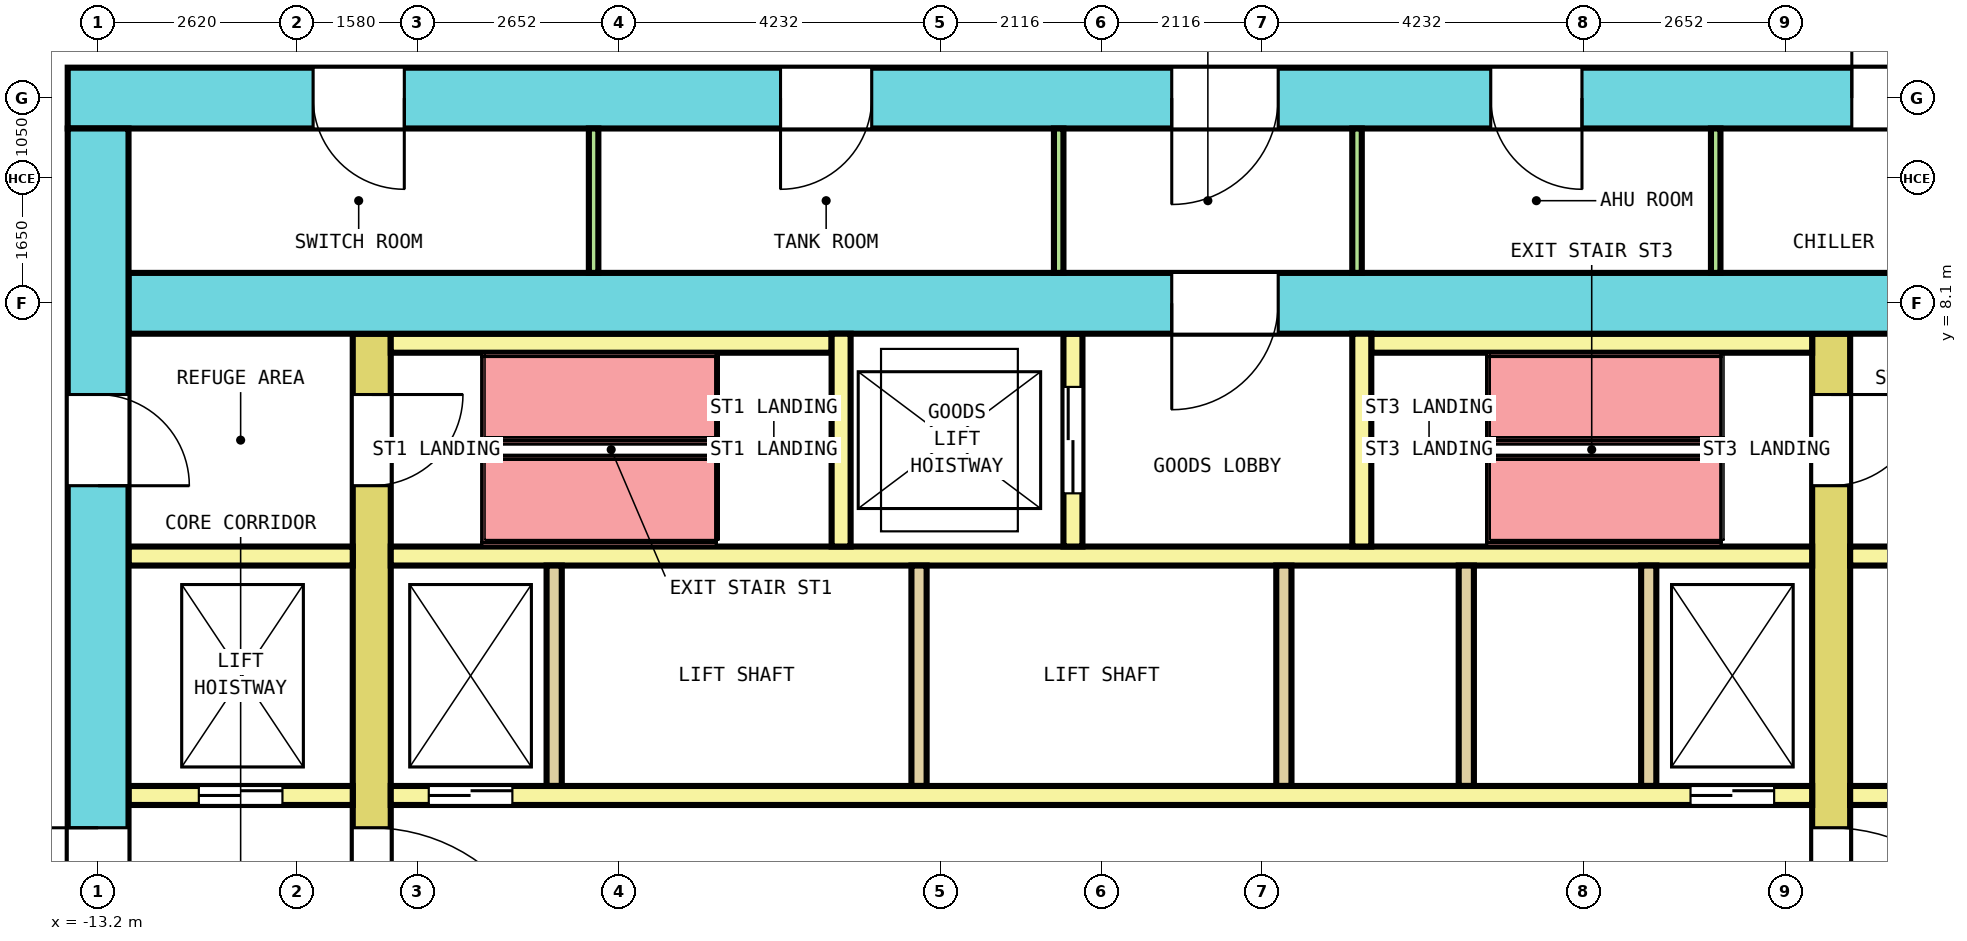
"""IFC4 building model, lengths in metres.
Left out: names, types, materials, properties, quantities, classifications, styles, units other than length and angle.
Written with IfcOpenShell. Run it as: python <this file> out.ifc"""

import sys

from ifc_helpers import new_model, si_unit, direction, frame, frame_2d, origin, place, context, subcontext, project, spatial, rectangle, extrude, element, fill, save


model = new_model("IFC4")
c1 = context("Model", 3, precision=1e-05, world=origin(), true_north=direction((0.0, 1.0)))
c2 = subcontext(c1, "Body", "Model", "MODEL_VIEW")
j1 = project(units=[si_unit("LENGTHUNIT", "METRE"), si_unit("PLANEANGLEUNIT", "RADIAN")], contexts=[c1])
p1 = place(None, origin())
s1 = spatial("IfcSite", under=j1, at=p1, CompositionType="ELEMENT")
p2 = place(p1, origin())
s2 = spatial("IfcBuilding", under=s1, at=p2, CompositionType="ELEMENT")
p3 = place(p2, frame((0.0, 0.0, 71.8)))
s3 = spatial("IfcBuildingStorey", under=s2, at=p3, CompositionType="ELEMENT", Elevation=71.8)
p4 = place(p3, frame((-13.6, 10.8, 0.0), z_axis=(0.0, 0.0, 1.0), x_axis=(1.0, 0.0, 0.0)))
e1 = element("IfcWall", 1, at=p4, inside=s3, PredefinedType="SHEAR", context=c2, shape_type="SweptSolid", body=[
    extrude(rectangle(XDim=27.2, YDim=0.8, at=frame_2d((13.6, 0.0))), origin(), (0.0, 0.0, 1.0), 8.7),
])
p5 = place(p4, frame((3.228, 0.0, 0.0)))
e2 = element("IfcOpeningElement", 2, at=p5, cuts=e1, PredefinedType="OPENING", context=c2, shape_type="SweptSolid", body=[
    extrude(rectangle(XDim=1.2, YDim=2.1, at=frame_2d((0.6, 1.05))), frame((0.0, 0.41, 0.0), z_axis=(0.0, -1.0, 0.0), x_axis=(1.0, 0.0, 0.0)), (0.0, 0.0, 1.0), 0.82),
])
p6 = place(p4, frame((9.378, 0.0, 0.0)))
e3 = element("IfcOpeningElement", 3, at=p6, cuts=e1, PredefinedType="OPENING", context=c2, shape_type="SweptSolid", body=[
    extrude(rectangle(XDim=1.2, YDim=2.1, at=frame_2d((0.6, 1.05))), frame((0.0, 0.41, 0.0), z_axis=(0.0, -1.0, 0.0), x_axis=(1.0, 0.0, 0.0)), (0.0, 0.0, 1.0), 0.82),
])
p7 = place(p4, frame((18.722, 0.0, 0.0)))
e4 = element("IfcOpeningElement", 4, at=p7, cuts=e1, PredefinedType="OPENING", context=c2, shape_type="SweptSolid", body=[
    extrude(rectangle(XDim=1.2, YDim=2.1, at=frame_2d((0.6, 1.05))), frame((0.0, 0.41, 0.0), z_axis=(0.0, -1.0, 0.0), x_axis=(1.0, 0.0, 0.0)), (0.0, 0.0, 1.0), 0.82),
])
p8 = place(p4, frame((23.472, 0.0, 0.0)))
e5 = element("IfcOpeningElement", 5, at=p8, cuts=e1, PredefinedType="OPENING", context=c2, shape_type="SweptSolid", body=[
    extrude(rectangle(XDim=1.2, YDim=2.1, at=frame_2d((0.6, 1.05))), frame((0.0, 0.41, 0.0), z_axis=(0.0, -1.0, 0.0), x_axis=(1.0, 0.0, 0.0)), (0.0, 0.0, 1.0), 0.82),
])
p9 = place(p4, frame((14.525, 0.0, 0.0)))
e6 = element("IfcOpeningElement", 6, at=p9, cuts=e1, PredefinedType="OPENING", context=c2, shape_type="SweptSolid", body=[
    extrude(rectangle(XDim=1.4, YDim=2.1, at=frame_2d((0.7, 1.05))), frame((0.0, 0.41, 0.0), z_axis=(0.0, -1.0, 0.0), x_axis=(1.0, 0.0, 0.0)), (0.0, 0.0, 1.0), 0.82),
])
p10 = place(p3, frame((-13.2, -10.4, 0.0), z_axis=(0.0, 0.0, 1.0), x_axis=(0.0, 1.0, 0.0)))
e7 = element("IfcWall", 7, at=p10, inside=s3, PredefinedType="SHEAR", context=c2, shape_type="SweptSolid", body=[
    extrude(rectangle(XDim=20.8, YDim=0.8, at=frame_2d((10.4, 0.0))), origin(), (0.0, 0.0, 1.0), 8.7),
])
p11 = place(p10, frame((9.2, 0.0, 0.0)))
e8 = element("IfcOpeningElement", 8, at=p11, cuts=e7, PredefinedType="OPENING", context=c2, shape_type="SweptSolid", body=[
    extrude(rectangle(XDim=2.4, YDim=2.1, at=frame_2d((1.2, 1.05))), frame((0.0, 0.41, 0.0), z_axis=(0.0, -1.0, 0.0), x_axis=(1.0, 0.0, 0.0)), (0.0, 0.0, 1.0), 0.82),
])
p12 = place(p10, frame((16.1, 0.0, 0.0)))
e9 = element("IfcOpeningElement", 9, at=p12, cuts=e7, PredefinedType="OPENING", context=c2, shape_type="SweptSolid", body=[
    extrude(rectangle(XDim=1.2, YDim=2.1, at=frame_2d((0.6, 1.05))), frame((0.0, 0.41, 0.0), z_axis=(0.0, -1.0, 0.0), x_axis=(1.0, 0.0, 0.0)), (0.0, 0.0, 1.0), 0.82),
])
p13 = place(p10, frame((3.5, 0.0, 0.0)))
e10 = element("IfcOpeningElement", 10, at=p13, cuts=e7, PredefinedType="OPENING", context=c2, shape_type="SweptSolid", body=[
    extrude(rectangle(XDim=1.2, YDim=2.1, at=frame_2d((0.6, 1.05))), frame((0.0, 0.41, 0.0), z_axis=(0.0, -1.0, 0.0), x_axis=(1.0, 0.0, 0.0)), (0.0, 0.0, 1.0), 0.82),
])
p14 = place(p3, frame((-12.8, 8.1, 0.0), z_axis=(0.0, 0.0, 1.0), x_axis=(1.0, 0.0, 0.0)))
e11 = element("IfcWall", 11, at=p14, inside=s3, PredefinedType="SHEAR", context=c2, shape_type="SweptSolid", body=[
    extrude(rectangle(XDim=25.6, YDim=0.8, at=frame_2d((12.8, 0.0))), origin(), (0.0, 0.0, 1.0), 8.7),
])
p15 = place(p14, frame((13.725, 0.0, 0.0)))
e12 = element("IfcOpeningElement", 12, at=p15, cuts=e11, PredefinedType="OPENING", context=c2, shape_type="SweptSolid", body=[
    extrude(rectangle(XDim=1.4, YDim=2.1, at=frame_2d((0.7, 1.05))), frame((0.0, 0.41, 0.0), z_axis=(0.0, -1.0, 0.0), x_axis=(1.0, 0.0, 0.0)), (0.0, 0.0, 1.0), 0.82),
])
p16 = place(p3, frame((-9.6, -7.7, 0.0), z_axis=(0.0, 0.0, 1.0), x_axis=(0.0, 1.0, 0.0)))
e13 = element("IfcWall", 13, at=p16, inside=s3, PredefinedType="SHEAR", context=c2, shape_type="SweptSolid", body=[
    extrude(rectangle(XDim=15.4, YDim=0.5, at=frame_2d((7.7, 0.0))), origin(), (0.0, 0.0, 1.0), 8.7),
])
p17 = place(p16, frame((6.5, 0.0, 0.0)))
e14 = element("IfcOpeningElement", 14, at=p17, cuts=e13, PredefinedType="OPENING", context=c2, shape_type="SweptSolid", body=[
    extrude(rectangle(XDim=2.4, YDim=2.1, at=frame_2d((1.2, 1.05))), frame((0.0, 0.26, 0.0), z_axis=(0.0, -1.0, 0.0), x_axis=(1.0, 0.0, 0.0)), (0.0, 0.0, 1.0), 0.52),
])
p18 = place(p16, frame((13.4, 0.0, 0.0)))
e15 = element("IfcOpeningElement", 15, at=p18, cuts=e13, PredefinedType="OPENING", context=c2, shape_type="SweptSolid", body=[
    extrude(rectangle(XDim=1.2, YDim=2.1, at=frame_2d((0.6, 1.05))), frame((0.0, 0.26, 0.0), z_axis=(0.0, -1.0, 0.0), x_axis=(1.0, 0.0, 0.0)), (0.0, 0.0, 1.0), 0.52),
])
p19 = place(p16, frame((0.8, 0.0, 0.0)))
e16 = element("IfcOpeningElement", 16, at=p19, cuts=e13, PredefinedType="OPENING", context=c2, shape_type="SweptSolid", body=[
    extrude(rectangle(XDim=1.2, YDim=2.1, at=frame_2d((0.6, 1.05))), frame((0.0, 0.26, 0.0), z_axis=(0.0, -1.0, 0.0), x_axis=(1.0, 0.0, 0.0)), (0.0, 0.0, 1.0), 0.52),
])
p20 = place(p3, frame((9.6, -7.7, 0.0), z_axis=(0.0, 0.0, 1.0), x_axis=(0.0, 1.0, 0.0)))
e17 = element("IfcWall", 17, at=p20, inside=s3, PredefinedType="SHEAR", context=c2, shape_type="SweptSolid", body=[
    extrude(rectangle(XDim=15.4, YDim=0.5, at=frame_2d((7.7, 0.0))), origin(), (0.0, 0.0, 1.0), 8.7),
])
p21 = place(p20, frame((6.5, 0.0, 0.0)))
e18 = element("IfcOpeningElement", 18, at=p21, cuts=e17, PredefinedType="OPENING", context=c2, shape_type="SweptSolid", body=[
    extrude(rectangle(XDim=2.4, YDim=2.1, at=frame_2d((1.2, 1.05))), frame((0.0, 0.26, 0.0), z_axis=(0.0, -1.0, 0.0), x_axis=(1.0, 0.0, 0.0)), (0.0, 0.0, 1.0), 0.52),
])
p22 = place(p20, frame((13.4, 0.0, 0.0)))
e19 = element("IfcOpeningElement", 19, at=p22, cuts=e17, PredefinedType="OPENING", context=c2, shape_type="SweptSolid", body=[
    extrude(rectangle(XDim=1.2, YDim=2.1, at=frame_2d((0.6, 1.05))), frame((0.0, 0.26, 0.0), z_axis=(0.0, -1.0, 0.0), x_axis=(1.0, 0.0, 0.0)), (0.0, 0.0, 1.0), 0.52),
])
p23 = place(p20, frame((0.9, 0.0, 0.0)))
e20 = element("IfcOpeningElement", 20, at=p23, cuts=e17, PredefinedType="OPENING", context=c2, shape_type="SweptSolid", body=[
    extrude(rectangle(XDim=1.0, YDim=2.1, at=frame_2d((0.5, 1.05))), frame((0.0, 0.26, 0.0), z_axis=(0.0, -1.0, 0.0), x_axis=(1.0, 0.0, 0.0)), (0.0, 0.0, 1.0), 0.52),
])
p24 = place(p3, frame((-12.8, 1.625, 0.0), z_axis=(0.0, 0.0, 1.0), x_axis=(1.0, 0.0, 0.0)))
e21 = element("IfcWall", 21, at=p24, inside=s3, PredefinedType="SOLIDWALL", context=c2, shape_type="SweptSolid", body=[
    extrude(rectangle(XDim=2.95, YDim=0.25, at=frame_2d((1.475, 0.0))), origin(), (0.0, 0.0, 1.0), 8.7),
])
p25 = place(p24, frame((0.925, 0.0, 0.0)))
e22 = element("IfcOpeningElement", 22, at=p25, cuts=e21, PredefinedType="OPENING", context=c2, shape_type="SweptSolid", body=[
    extrude(rectangle(XDim=1.1, YDim=2.1, at=frame_2d((0.55, 1.05))), frame((0.0, 0.135, 0.0), z_axis=(0.0, -1.0, 0.0), x_axis=(1.0, 0.0, 0.0)), (0.0, 0.0, 1.0), 0.27),
])
p26 = place(p3, frame((-9.35, 1.625, 0.0), z_axis=(0.0, 0.0, 1.0), x_axis=(1.0, 0.0, 0.0)))
e23 = element("IfcWall", 23, at=p26, inside=s3, PredefinedType="SOLIDWALL", context=c2, shape_type="SweptSolid", body=[
    extrude(rectangle(XDim=18.7, YDim=0.25, at=frame_2d((9.35, 0.0))), origin(), (0.0, 0.0, 1.0), 8.7),
])
p27 = place(p26, frame((0.5, 0.0, 0.0)))
e24 = element("IfcOpeningElement", 24, at=p27, cuts=e23, PredefinedType="OPENING", context=c2, shape_type="SweptSolid", body=[
    extrude(rectangle(XDim=1.1, YDim=2.1, at=frame_2d((0.55, 1.05))), frame((0.0, 0.135, 0.0), z_axis=(0.0, -1.0, 0.0), x_axis=(1.0, 0.0, 0.0)), (0.0, 0.0, 1.0), 0.27),
])
p28 = place(p26, frame((17.1, 0.0, 0.0)))
e25 = element("IfcOpeningElement", 25, at=p28, cuts=e23, PredefinedType="OPENING", context=c2, shape_type="SweptSolid", body=[
    extrude(rectangle(XDim=1.1, YDim=2.1, at=frame_2d((0.55, 1.05))), frame((0.0, 0.135, 0.0), z_axis=(0.0, -1.0, 0.0), x_axis=(1.0, 0.0, 0.0)), (0.0, 0.0, 1.0), 0.27),
])
p29 = place(p3, frame((9.85, 1.625, 0.0), z_axis=(0.0, 0.0, 1.0), x_axis=(1.0, 0.0, 0.0)))
e26 = element("IfcWall", 26, at=p29, inside=s3, PredefinedType="SOLIDWALL", context=c2, shape_type="SweptSolid", body=[
    extrude(rectangle(XDim=2.95, YDim=0.25, at=frame_2d((1.475, 0.0))), origin(), (0.0, 0.0, 1.0), 8.7),
])
p30 = place(p29, frame((0.925, 0.0, 0.0)))
e27 = element("IfcOpeningElement", 27, at=p30, cuts=e26, PredefinedType="OPENING", context=c2, shape_type="SweptSolid", body=[
    extrude(rectangle(XDim=1.1, YDim=2.1, at=frame_2d((0.55, 1.05))), frame((0.0, 0.135, 0.0), z_axis=(0.0, -1.0, 0.0), x_axis=(1.0, 0.0, 0.0)), (0.0, 0.0, 1.0), 0.27),
])
p31 = place(p3, frame((-12.8, 4.775, 0.0), z_axis=(0.0, 0.0, 1.0), x_axis=(1.0, 0.0, 0.0)))
e28 = element("IfcWall", 28, at=p31, inside=s3, PredefinedType="SOLIDWALL", context=c2, shape_type="SweptSolid", body=[
    extrude(rectangle(XDim=2.95, YDim=0.25, at=frame_2d((1.475, 0.0))), origin(), (0.0, 0.0, 1.0), 8.7),
])
p32 = place(p3, frame((-9.35, 4.775, 0.0), z_axis=(0.0, 0.0, 1.0), x_axis=(1.0, 0.0, 0.0)))
e29 = element("IfcWall", 29, at=p32, inside=s3, PredefinedType="SOLIDWALL", context=c2, shape_type="SweptSolid", body=[
    extrude(rectangle(XDim=18.7, YDim=0.25, at=frame_2d((9.35, 0.0))), origin(), (0.0, 0.0, 1.0), 8.7),
])
p33 = place(p3, frame((9.85, 4.775, 0.0), z_axis=(0.0, 0.0, 1.0), x_axis=(1.0, 0.0, 0.0)))
e30 = element("IfcWall", 30, at=p33, inside=s3, PredefinedType="SOLIDWALL", context=c2, shape_type="SweptSolid", body=[
    extrude(rectangle(XDim=2.95, YDim=0.25, at=frame_2d((1.475, 0.0))), origin(), (0.0, 0.0, 1.0), 8.7),
])
for number, where, z_axis, x_axis in (
    (31, (-7.2, 1.75, 0.0), (0.0, 0.0, 1.0), (0.0, 1.0, 0.0)),
    (32, (-2.4, 1.75, 0.0), (0.0, 0.0, 1.0), (0.0, 1.0, 0.0)),
    (33, (2.4, 1.75, 0.0), (0.0, 0.0, 1.0), (0.0, 1.0, 0.0)),
    (34, (4.8, 1.75, 0.0), (0.0, 0.0, 1.0), (0.0, 1.0, 0.0)),
    (35, (7.2, 1.75, 0.0), (0.0, 0.0, 1.0), (0.0, 1.0, 0.0)),
):
    element("IfcWall", number, at=place(p3, frame(where, z_axis=z_axis, x_axis=x_axis)), inside=s3, PredefinedType="SOLIDWALL", context=c2, shape_type="SweptSolid", body=[
        extrude(rectangle(XDim=2.9, YDim=0.2, at=frame_2d((1.45, 0.0))), origin(), (0.0, 0.0, 1.0), 8.7),
    ])
for number, where, z_axis, x_axis in (
    (36, (-9.35, 7.575, 0.0), (0.0, 0.0, 1.0), (1.0, 0.0, 0.0)),
    (37, (3.55, 7.575, 0.0), (0.0, 0.0, 1.0), (1.0, 0.0, 0.0)),
):
    element("IfcWall", number, at=place(p3, frame(where, z_axis=z_axis, x_axis=x_axis)), inside=s3, PredefinedType="SOLIDWALL", context=c2, shape_type="SweptSolid", body=[
        extrude(rectangle(XDim=5.8, YDim=0.25, at=frame_2d((2.9, 0.0))), origin(), (0.0, 0.0, 1.0), 8.7),
    ])
p34 = place(p3, frame((-3.425, 4.9, 0.0), z_axis=(0.0, 0.0, 1.0), x_axis=(0.0, 1.0, 0.0)))
e38 = element("IfcWall", 38, at=p34, inside=s3, PredefinedType="SOLIDWALL", context=c2, shape_type="SweptSolid", body=[
    extrude(rectangle(XDim=2.8, YDim=0.25, at=frame_2d((1.4, 0.0))), origin(), (0.0, 0.0, 1.0), 8.7),
])
p35 = place(p3, frame((-0.375, 4.9, 0.0), z_axis=(0.0, 0.0, 1.0), x_axis=(0.0, 1.0, 0.0)))
e39 = element("IfcWall", 39, at=p35, inside=s3, PredefinedType="SOLIDWALL", context=c2, shape_type="SweptSolid", body=[
    extrude(rectangle(XDim=2.8, YDim=0.25, at=frame_2d((1.4, 0.0))), origin(), (0.0, 0.0, 1.0), 8.7),
])
p36 = place(p35, frame((0.7, 0.0, 0.0)))
e40 = element("IfcOpeningElement", 40, at=p36, cuts=e39, PredefinedType="OPENING", context=c2, shape_type="SweptSolid", body=[
    extrude(rectangle(XDim=1.4, YDim=2.1, at=frame_2d((0.7, 1.05))), frame((0.0, 0.135, 0.0), z_axis=(0.0, -1.0, 0.0), x_axis=(1.0, 0.0, 0.0)), (0.0, 0.0, 1.0), 0.27),
])
p37 = place(p3, frame((3.425, 4.9, 0.0), z_axis=(0.0, 0.0, 1.0), x_axis=(0.0, 1.0, 0.0)))
e41 = element("IfcWall", 41, at=p37, inside=s3, PredefinedType="SOLIDWALL", context=c2, shape_type="SweptSolid", body=[
    extrude(rectangle(XDim=2.8, YDim=0.25, at=frame_2d((1.4, 0.0))), origin(), (0.0, 0.0, 1.0), 8.7),
])
for number, where, z_axis, x_axis in (
    (42, (-6.681, 8.5, 0.0), (0.0, 0.0, 1.0), (0.0, 1.0, 0.0)),
    (43, (-0.562, 8.5, 0.0), (0.0, 0.0, 1.0), (0.0, 1.0, 0.0)),
    (44, (3.363, 8.5, 0.0), (0.0, 0.0, 1.0), (0.0, 1.0, 0.0)),
    (45, (8.081, 8.5, 0.0), (0.0, 0.0, 1.0), (0.0, 1.0, 0.0)),
):
    element("IfcWall", number, at=place(p3, frame(where, z_axis=z_axis, x_axis=x_axis)), inside=s3, PredefinedType="PARTITIONING", context=c2, shape_type="SweptSolid", body=[
        extrude(rectangle(XDim=1.9, YDim=0.125, at=frame_2d((0.95, 0.0))), origin(), (0.0, 0.0, 1.0), 8.7),
    ])
p38 = place(p25, origin())
e46 = element("IfcDoor", 46, at=p38, inside=s3, OperationType="DOUBLE_DOOR_SLIDING", PredefinedType="DOOR", context=c2, shape_type="SweptSolid", body=[
    extrude(rectangle(XDim=1.1, YDim=2.1, at=frame_2d((0.55, 1.05))), frame((0.0, 0.075, 0.0), z_axis=(0.0, -1.0, 0.0), x_axis=(1.0, 0.0, 0.0)), (0.0, 0.0, 1.0), 0.15),
])
fill(e22, e46)
p39 = place(p27, origin())
e47 = element("IfcDoor", 47, at=p39, inside=s3, OperationType="DOUBLE_DOOR_SLIDING", PredefinedType="DOOR", context=c2, shape_type="SweptSolid", body=[
    extrude(rectangle(XDim=1.1, YDim=2.1, at=frame_2d((0.55, 1.05))), frame((0.0, 0.075, 0.0), z_axis=(0.0, -1.0, 0.0), x_axis=(1.0, 0.0, 0.0)), (0.0, 0.0, 1.0), 0.15),
])
fill(e24, e47)
p40 = place(p28, origin())
e48 = element("IfcDoor", 48, at=p40, inside=s3, OperationType="DOUBLE_DOOR_SLIDING", PredefinedType="DOOR", context=c2, shape_type="SweptSolid", body=[
    extrude(rectangle(XDim=1.1, YDim=2.1, at=frame_2d((0.55, 1.05))), frame((0.0, 0.075, 0.0), z_axis=(0.0, -1.0, 0.0), x_axis=(1.0, 0.0, 0.0)), (0.0, 0.0, 1.0), 0.15),
])
fill(e25, e48)
p41 = place(p36, origin())
e49 = element("IfcDoor", 49, at=p41, inside=s3, OperationType="DOUBLE_DOOR_SLIDING", PredefinedType="DOOR", context=c2, shape_type="SweptSolid", body=[
    extrude(rectangle(XDim=1.4, YDim=2.1, at=frame_2d((0.7, 1.05))), frame((0.0, 0.075, 0.0), z_axis=(0.0, -1.0, 0.0), x_axis=(1.0, 0.0, 0.0)), (0.0, 0.0, 1.0), 0.15),
])
fill(e40, e49)
p42 = place(p17, origin())
e50 = element("IfcDoor", 50, at=p42, inside=s3, OperationType="DOUBLE_DOOR_SINGLE_SWING", PredefinedType="DOOR", context=c2, shape_type="SweptSolid", body=[
    extrude(rectangle(XDim=2.4, YDim=2.1, at=frame_2d((1.2, 1.05))), frame((0.0, 0.2, 0.0), z_axis=(0.0, -1.0, 0.0), x_axis=(1.0, 0.0, 0.0)), (0.0, 0.0, 1.0), 0.4),
])
fill(e14, e50)
p43 = place(p21, origin())
e51 = element("IfcDoor", 51, at=p43, inside=s3, OperationType="DOUBLE_DOOR_SINGLE_SWING", PredefinedType="DOOR", context=c2, shape_type="SweptSolid", body=[
    extrude(rectangle(XDim=2.4, YDim=2.1, at=frame_2d((1.2, 1.05))), frame((0.0, 0.2, 0.0), z_axis=(0.0, -1.0, 0.0), x_axis=(1.0, 0.0, 0.0)), (0.0, 0.0, 1.0), 0.4),
])
fill(e18, e51)
p44 = place(p11, origin())
e52 = element("IfcDoor", 52, at=p44, inside=s3, OperationType="DOUBLE_DOOR_SINGLE_SWING", PredefinedType="DOOR", context=c2, shape_type="SweptSolid", body=[
    extrude(rectangle(XDim=2.4, YDim=2.1, at=frame_2d((1.2, 1.05))), frame((0.0, 0.3, 0.0), z_axis=(0.0, -1.0, 0.0), x_axis=(1.0, 0.0, 0.0)), (0.0, 0.0, 1.0), 0.6),
])
fill(e8, e52)
p45 = place(p18, origin())
e53 = element("IfcDoor", 53, at=p45, inside=s3, OperationType="SINGLE_SWING_RIGHT", PredefinedType="DOOR", context=c2, shape_type="SweptSolid", body=[
    extrude(rectangle(XDim=1.2, YDim=2.1, at=frame_2d((0.6, 1.05))), frame((0.0, 0.2, 0.0), z_axis=(0.0, -1.0, 0.0), x_axis=(1.0, 0.0, 0.0)), (0.0, 0.0, 1.0), 0.4),
])
fill(e15, e53)
p46 = place(p12, origin())
e54 = element("IfcDoor", 54, at=p46, inside=s3, OperationType="SINGLE_SWING_LEFT", PredefinedType="DOOR", context=c2, shape_type="SweptSolid", body=[
    extrude(rectangle(XDim=1.2, YDim=2.1, at=frame_2d((0.6, 1.05))), frame((0.0, 0.3, 0.0), z_axis=(0.0, -1.0, 0.0), x_axis=(1.0, 0.0, 0.0)), (0.0, 0.0, 1.0), 0.6),
])
fill(e9, e54)
p47 = place(p22, origin())
e55 = element("IfcDoor", 55, at=p47, inside=s3, OperationType="SINGLE_SWING_RIGHT", PredefinedType="DOOR", context=c2, shape_type="SweptSolid", body=[
    extrude(rectangle(XDim=1.2, YDim=2.1, at=frame_2d((0.6, 1.05))), frame((0.0, 0.2, 0.0), z_axis=(0.0, -1.0, 0.0), x_axis=(1.0, 0.0, 0.0)), (0.0, 0.0, 1.0), 0.4),
])
fill(e19, e55)
p48 = place(p15, origin())
e56 = element("IfcDoor", 56, at=p48, inside=s3, OperationType="DOUBLE_DOOR_SINGLE_SWING", PredefinedType="DOOR", context=c2, shape_type="SweptSolid", body=[
    extrude(rectangle(XDim=1.4, YDim=2.1, at=frame_2d((0.7, 1.05))), frame((0.0, 0.3, 0.0), z_axis=(0.0, -1.0, 0.0), x_axis=(1.0, 0.0, 0.0)), (0.0, 0.0, 1.0), 0.6),
])
fill(e12, e56)
p49 = place(p5, origin())
e57 = element("IfcDoor", 57, at=p49, inside=s3, OperationType="SINGLE_SWING_RIGHT", PredefinedType="DOOR", context=c2, shape_type="SweptSolid", body=[
    extrude(rectangle(XDim=1.2, YDim=2.1, at=frame_2d((0.6, 1.05))), frame((0.0, 0.3, 0.0), z_axis=(0.0, -1.0, 0.0), x_axis=(1.0, 0.0, 0.0)), (0.0, 0.0, 1.0), 0.6),
])
fill(e2, e57)
p50 = place(p6, origin())
e58 = element("IfcDoor", 58, at=p50, inside=s3, OperationType="SINGLE_SWING_LEFT", PredefinedType="DOOR", context=c2, shape_type="SweptSolid", body=[
    extrude(rectangle(XDim=1.2, YDim=2.1, at=frame_2d((0.6, 1.05))), frame((0.0, 0.3, 0.0), z_axis=(0.0, -1.0, 0.0), x_axis=(1.0, 0.0, 0.0)), (0.0, 0.0, 1.0), 0.6),
])
fill(e3, e58)
p51 = place(p7, origin())
e59 = element("IfcDoor", 59, at=p51, inside=s3, OperationType="SINGLE_SWING_RIGHT", PredefinedType="DOOR", context=c2, shape_type="SweptSolid", body=[
    extrude(rectangle(XDim=1.2, YDim=2.1, at=frame_2d((0.6, 1.05))), frame((0.0, 0.3, 0.0), z_axis=(0.0, -1.0, 0.0), x_axis=(1.0, 0.0, 0.0)), (0.0, 0.0, 1.0), 0.6),
])
fill(e4, e59)
p52 = place(p8, origin())
e60 = element("IfcDoor", 60, at=p52, inside=s3, OperationType="SINGLE_SWING_LEFT", PredefinedType="DOOR", context=c2, shape_type="SweptSolid", body=[
    extrude(rectangle(XDim=1.2, YDim=2.1, at=frame_2d((0.6, 1.05))), frame((0.0, 0.3, 0.0), z_axis=(0.0, -1.0, 0.0), x_axis=(1.0, 0.0, 0.0)), (0.0, 0.0, 1.0), 0.6),
])
fill(e5, e60)
p53 = place(p9, origin())
e61 = element("IfcDoor", 61, at=p53, inside=s3, OperationType="DOUBLE_DOOR_SINGLE_SWING", PredefinedType="DOOR", context=c2, shape_type="SweptSolid", body=[
    extrude(rectangle(XDim=1.4, YDim=2.1, at=frame_2d((0.7, 1.05))), frame((0.0, 0.3, 0.0), z_axis=(0.0, -1.0, 0.0), x_axis=(1.0, 0.0, 0.0)), (0.0, 0.0, 1.0), 0.6),
])
fill(e6, e61)
save(model, sys.argv[1])
